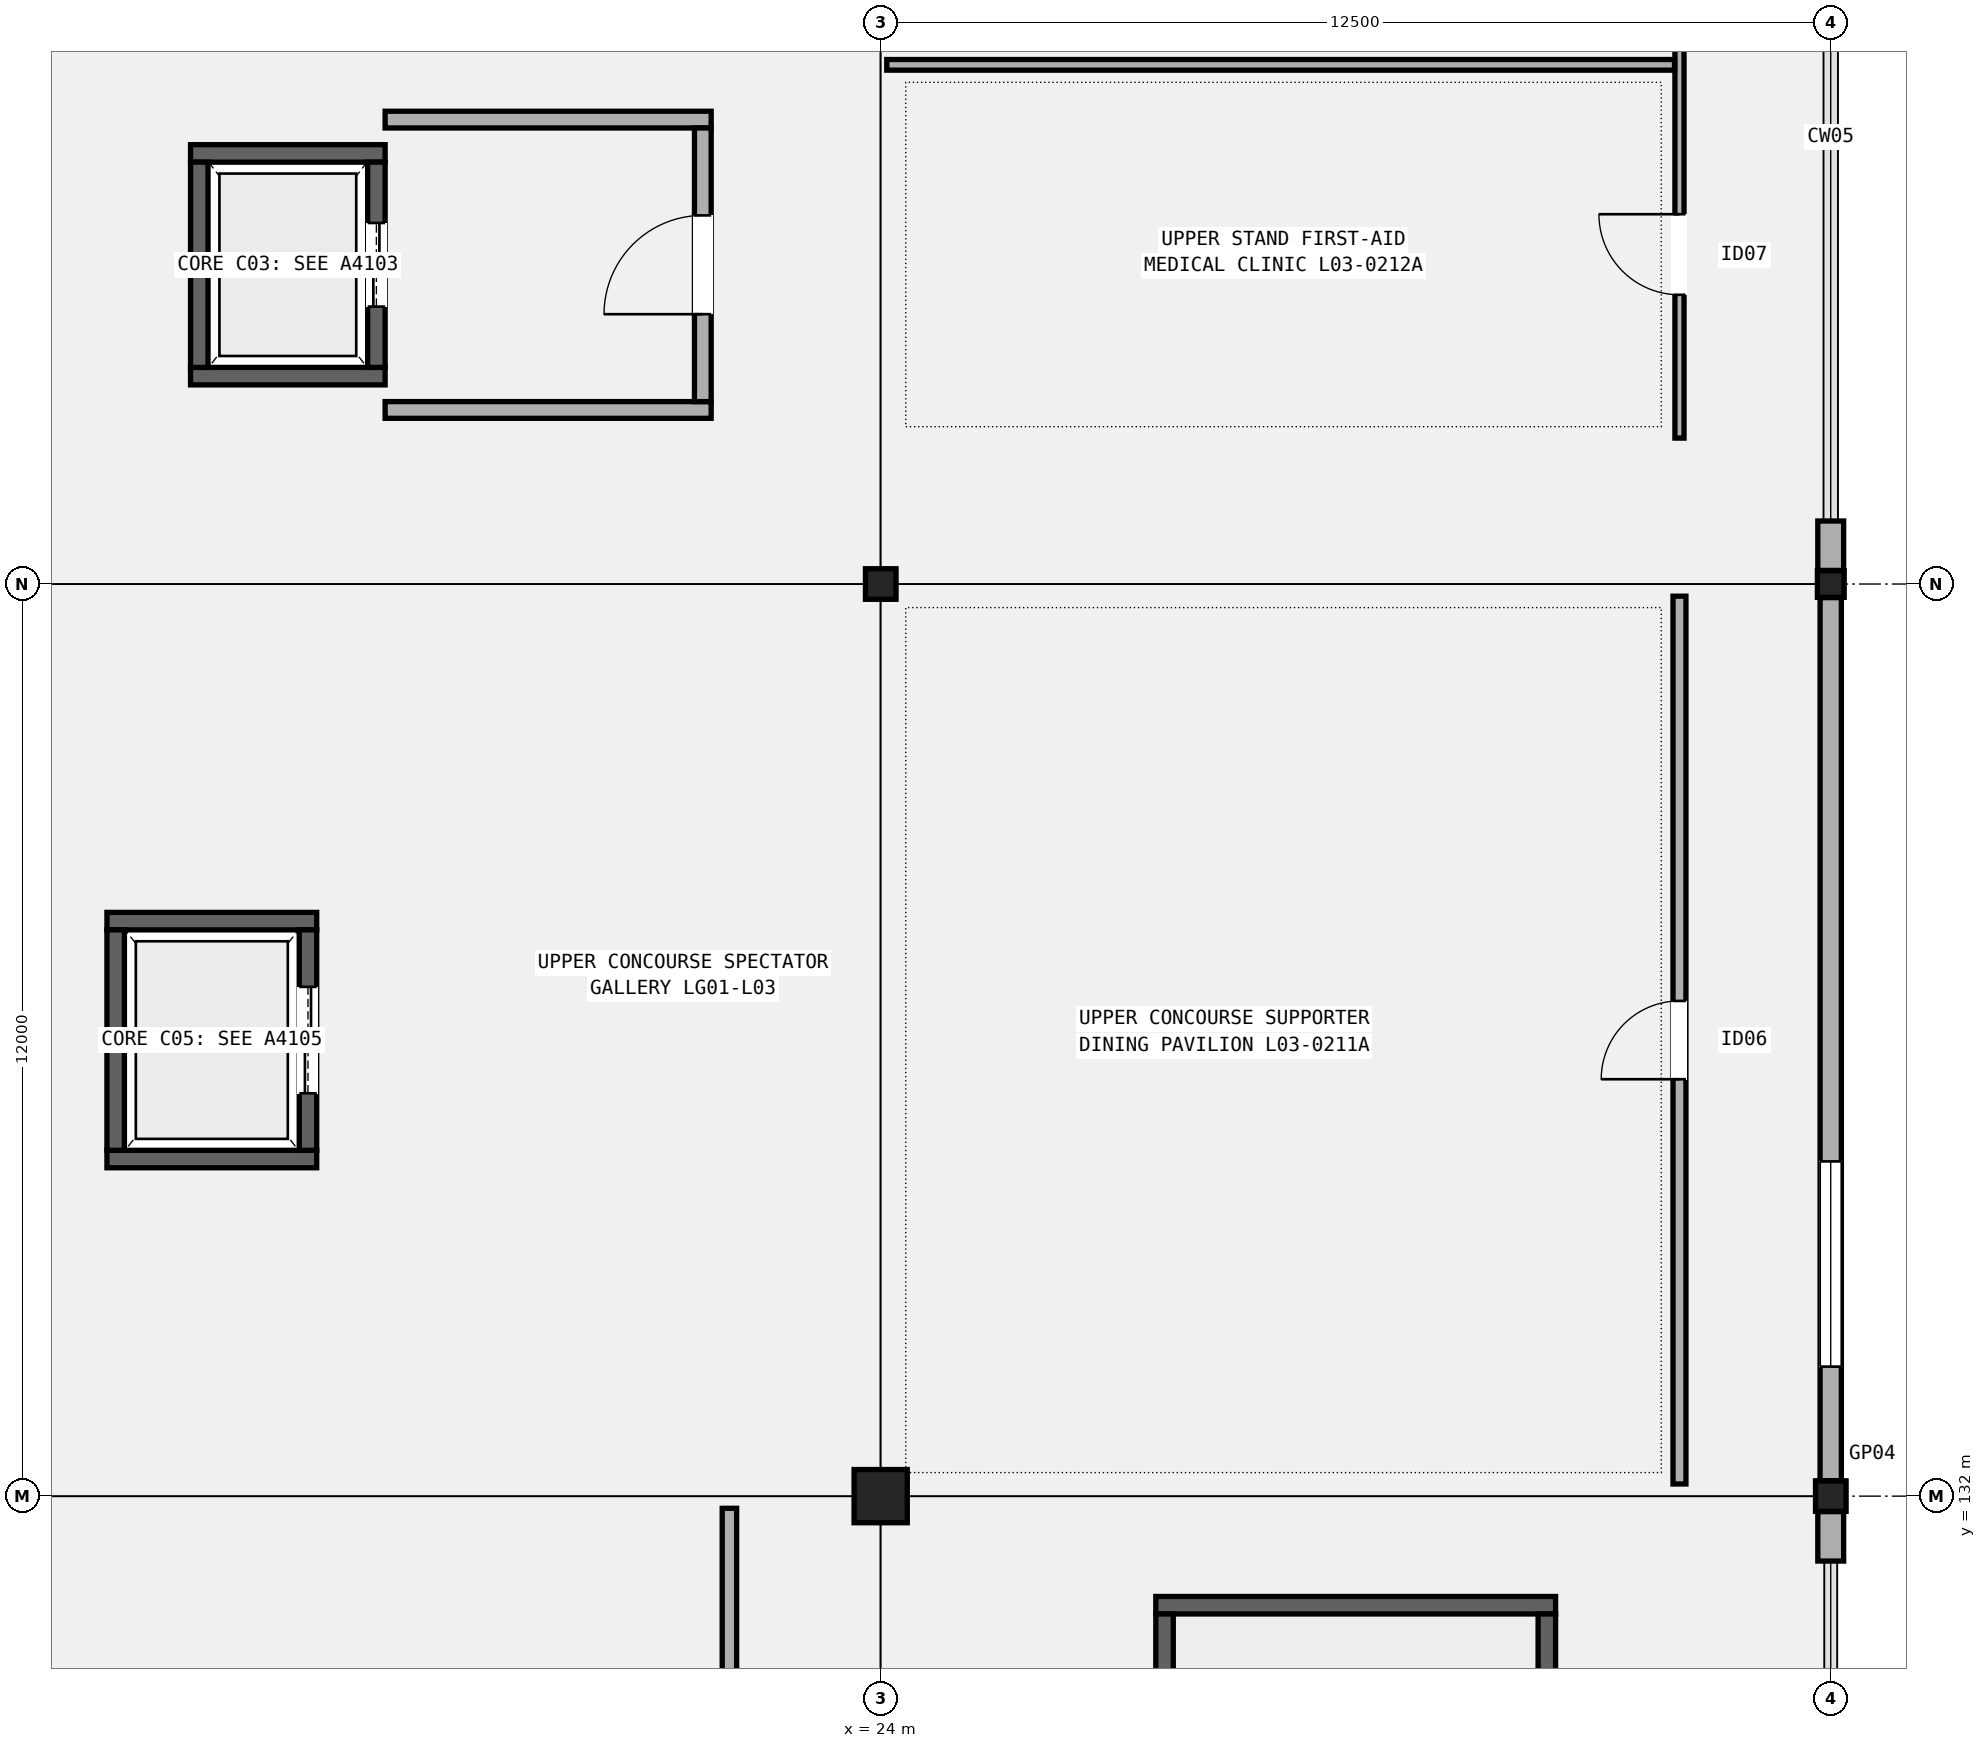
"""IFC4 building model, lengths in metres.
Left out: names, types, materials, properties, quantities, classifications, styles, units other than length and angle.
Written with IfcOpenShell. Run it as: python <this file> out.ifc"""

import sys

from ifc_helpers import new_model, si_unit, direction, frame, frame_2d, origin, origin_2d, place, context, subcontext, project, spatial, rectangle, hollow_rectangle, extrude, element, fill, save


model = new_model("IFC4")
c1 = context("Model", 3, precision=1e-05, world=origin(), true_north=direction((0.0, 1.0)))
c2 = subcontext(c1, "Body", "Model", "MODEL_VIEW")
j1 = project(units=[si_unit("LENGTHUNIT", "METRE"), si_unit("PLANEANGLEUNIT", "RADIAN")], contexts=[c1])
p1 = place(None, origin())
s1 = spatial("IfcSite", under=j1, at=p1, CompositionType="ELEMENT")
p2 = place(p1, origin())
s2 = spatial("IfcBuilding", under=s1, at=p2, CompositionType="ELEMENT")
p3 = place(p2, frame((0.0, 0.0, 15.3)))
s3 = spatial("IfcBuildingStorey", under=s2, at=p3, CompositionType="ELEMENT", Elevation=15.3)
p4 = place(p3, frame((24.0, 132.0, 0.0), z_axis=(0.0, 0.0, 1.0), x_axis=(1.0, 0.0, 0.0)))
e1 = element("IfcColumn", 1, at=p4, inside=s3, PredefinedType="COLUMN", context=c2, shape_type="SweptSolid", body=[
    extrude(rectangle(XDim=0.7, YDim=0.7, at=origin_2d()), origin(), (0.0, 0.0, 1.0), 5.1),
])
for number, where, z_axis, x_axis in (
    (2, (24.0, 144.0, 0.0), (0.0, 0.0, 1.0), (1.0, 0.0, 0.0)),
    (3, (36.5, 132.0, 0.0), (0.0, 0.0, 1.0), (1.0, 0.0, 0.0)),
):
    element("IfcColumn", number, at=place(p3, frame(where, z_axis=z_axis, x_axis=x_axis)), inside=s3, PredefinedType="COLUMN", context=c2, shape_type="SweptSolid", body=[
        extrude(hollow_rectangle(XDim=0.4, YDim=0.4, WallThickness=0.016, InnerFilletRadius=0.016, OuterFilletRadius=0.032, at=origin_2d()), origin(), (0.0, 0.0, 1.0), 5.1),
    ])
p5 = place(p3, frame((36.5, 144.0, 0.0), z_axis=(0.0, 0.0, 1.0), x_axis=(1.0, 0.0, 0.0)))
e4 = element("IfcColumn", 4, at=p5, inside=s3, PredefinedType="COLUMN", context=c2, shape_type="SweptSolid", body=[
    extrude(hollow_rectangle(XDim=0.35, YDim=0.35, WallThickness=0.016, InnerFilletRadius=0.016, OuterFilletRadius=0.032, at=origin_2d()), origin(), (0.0, 0.0, 1.0), 5.1),
])
p6 = place(p3, frame((36.5, 131.146, 0.0), z_axis=(0.0, 0.0, 1.0), x_axis=(0.0, 1.0, 0.0)))
e5 = element("IfcWall", 5, at=p6, inside=s3, PredefinedType="SOLIDWALL", context=c2, shape_type="SweptSolid", body=[
    extrude(rectangle(XDim=0.65, YDim=0.34, at=frame_2d((0.325, 0.0))), origin(), (0.0, 0.0, 1.0), 4.16),
])
p7 = place(p3, frame((36.5, 132.204, 0.0), z_axis=(0.0, 0.0, 1.0), x_axis=(0.0, 1.0, 0.0)))
e6 = element("IfcWall", 6, at=p7, inside=s3, PredefinedType="SOLIDWALL", context=c2, shape_type="SweptSolid", body=[
    extrude(rectangle(XDim=11.617, YDim=0.28, at=frame_2d((5.809, 0.0))), origin(), (0.0, 0.0, 1.0), 4.172),
])
p8 = place(p7, frame((1.5, 0.0, 0.95)))
e7 = element("IfcOpeningElement", 7, at=p8, cuts=e6, PredefinedType="OPENING", context=c2, shape_type="SweptSolid", body=[
    extrude(rectangle(XDim=2.7, YDim=2.2, at=frame_2d((1.35, 1.1))), frame((0.0, 0.15, 0.0), z_axis=(0.0, -1.0, 0.0), x_axis=(1.0, 0.0, 0.0)), (0.0, 0.0, 1.0), 0.3),
])
p9 = place(p3, frame((36.5, 144.179, 0.0), z_axis=(0.0, 0.0, 1.0), x_axis=(0.0, 1.0, 0.0)))
e8 = element("IfcWall", 8, at=p9, inside=s3, PredefinedType="SOLIDWALL", context=c2, shape_type="SweptSolid", body=[
    extrude(rectangle(XDim=0.65, YDim=0.34, at=frame_2d((0.325, 0.0))), origin(), (0.0, 0.0, 1.0), 4.06),
])
p10 = place(p3, frame((27.62, 130.565, 0.0), z_axis=(0.0, 0.0, 1.0), x_axis=(1.0, 0.0, 0.0)))
e9 = element("IfcWall", 9, at=p10, inside=s3, PredefinedType="SHEAR", context=c2, shape_type="SweptSolid", body=[
    extrude(rectangle(XDim=5.26, YDim=0.23, at=frame_2d((2.63, 0.0))), origin(), (0.0, 0.0, 1.0), 4.86),
])
for number, where, z_axis, x_axis in (
    (10, (27.735, 121.55, 0.0), (0.0, 0.0, 1.0), (0.0, 1.0, 0.0)),
    (11, (32.765, 121.55, 0.0), (0.0, 0.0, 1.0), (0.0, 1.0, 0.0)),
):
    element("IfcWall", number, at=place(p3, frame(where, z_axis=z_axis, x_axis=x_axis)), inside=s3, PredefinedType="SHEAR", context=c2, shape_type="SweptSolid", body=[
        extrude(rectangle(XDim=8.9, YDim=0.23, at=frame_2d((4.45, 0.0))), origin(), (0.0, 0.0, 1.0), 4.86),
    ])
for number, where, z_axis, x_axis in (
    (12, (14.92, 146.735, 0.0), (0.0, 0.0, 1.0), (1.0, 0.0, 0.0)),
    (13, (14.92, 149.665, 0.0), (0.0, 0.0, 1.0), (1.0, 0.0, 0.0)),
):
    element("IfcWall", number, at=place(p3, frame(where, z_axis=z_axis, x_axis=x_axis)), inside=s3, PredefinedType="SHEAR", context=c2, shape_type="SweptSolid", body=[
        extrude(rectangle(XDim=2.56, YDim=0.23, at=frame_2d((1.28, 0.0))), origin(), (0.0, 0.0, 1.0), 4.86),
    ])
p11 = place(p3, frame((15.035, 146.85, 0.0), z_axis=(0.0, 0.0, 1.0), x_axis=(0.0, 1.0, 0.0)))
e14 = element("IfcWall", 14, at=p11, inside=s3, PredefinedType="SHEAR", context=c2, shape_type="SweptSolid", body=[
    extrude(rectangle(XDim=2.7, YDim=0.23, at=frame_2d((1.35, 0.0))), origin(), (0.0, 0.0, 1.0), 4.86),
])
p12 = place(p3, frame((17.365, 146.85, 0.0), z_axis=(0.0, 0.0, 1.0), x_axis=(0.0, 1.0, 0.0)))
e15 = element("IfcWall", 15, at=p12, inside=s3, PredefinedType="SHEAR", context=c2, shape_type="SweptSolid", body=[
    extrude(rectangle(XDim=2.7, YDim=0.23, at=frame_2d((1.35, 0.0))), origin(), (0.0, 0.0, 1.0), 4.86),
])
p13 = place(p12, frame((0.8, 0.0, 0.0)))
e16 = element("IfcOpeningElement", 16, at=p13, cuts=e15, PredefinedType="OPENING", context=c2, shape_type="SweptSolid", body=[
    extrude(rectangle(XDim=1.1, YDim=2.15, at=frame_2d((0.55, 1.075))), frame((0.0, 0.125, 0.0), z_axis=(0.0, -1.0, 0.0), x_axis=(1.0, 0.0, 0.0)), (0.0, 0.0, 1.0), 0.25),
])
for number, where, z_axis, x_axis in (
    (17, (17.48, 146.29, 0.0), (0.0, 0.0, 1.0), (1.0, 0.0, 0.0)),
    (18, (17.48, 150.11, 0.0), (0.0, 0.0, 1.0), (1.0, 0.0, 0.0)),
):
    element("IfcWall", number, at=place(p3, frame(where, z_axis=z_axis, x_axis=x_axis)), inside=s3, PredefinedType="SOLIDWALL", context=c2, shape_type="SweptSolid", body=[
        extrude(rectangle(XDim=4.29, YDim=0.22, at=frame_2d((2.145, 0.0))), origin(), (0.0, 0.0, 1.0), 4.22),
    ])
p14 = place(p3, frame((21.66, 146.4, 0.0), z_axis=(0.0, 0.0, 1.0), x_axis=(0.0, 1.0, 0.0)))
e19 = element("IfcWall", 19, at=p14, inside=s3, PredefinedType="SOLIDWALL", context=c2, shape_type="SweptSolid", body=[
    extrude(rectangle(XDim=3.6, YDim=0.22, at=frame_2d((1.8, 0.0))), origin(), (0.0, 0.0, 1.0), 4.22),
])
p15 = place(p14, frame((1.15, 0.0, 0.0)))
e20 = element("IfcOpeningElement", 20, at=p15, cuts=e19, PredefinedType="OPENING", context=c2, shape_type="SweptSolid", body=[
    extrude(rectangle(XDim=1.3, YDim=2.15, at=frame_2d((0.65, 1.075))), frame((0.0, 0.12, 0.0), z_axis=(0.0, -1.0, 0.0), x_axis=(1.0, 0.0, 0.0)), (0.0, 0.0, 1.0), 0.24),
])
for number, where, z_axis, x_axis in (
    (21, (13.82, 136.435, 0.0), (0.0, 0.0, 1.0), (1.0, 0.0, 0.0)),
    (22, (13.82, 139.565, 0.0), (0.0, 0.0, 1.0), (1.0, 0.0, 0.0)),
):
    element("IfcWall", number, at=place(p3, frame(where, z_axis=z_axis, x_axis=x_axis)), inside=s3, PredefinedType="SHEAR", context=c2, shape_type="SweptSolid", body=[
        extrude(rectangle(XDim=2.76, YDim=0.23, at=frame_2d((1.38, 0.0))), origin(), (0.0, 0.0, 1.0), 4.86),
    ])
p16 = place(p3, frame((13.935, 136.55, 0.0), z_axis=(0.0, 0.0, 1.0), x_axis=(0.0, 1.0, 0.0)))
e23 = element("IfcWall", 23, at=p16, inside=s3, PredefinedType="SHEAR", context=c2, shape_type="SweptSolid", body=[
    extrude(rectangle(XDim=2.9, YDim=0.23, at=frame_2d((1.45, 0.0))), origin(), (0.0, 0.0, 1.0), 4.86),
])
p17 = place(p3, frame((16.465, 136.55, 0.0), z_axis=(0.0, 0.0, 1.0), x_axis=(0.0, 1.0, 0.0)))
e24 = element("IfcWall", 24, at=p17, inside=s3, PredefinedType="SHEAR", context=c2, shape_type="SweptSolid", body=[
    extrude(rectangle(XDim=2.9, YDim=0.23, at=frame_2d((1.45, 0.0))), origin(), (0.0, 0.0, 1.0), 4.86),
])
p18 = place(p17, frame((0.75, 0.0, 0.0)))
e25 = element("IfcOpeningElement", 25, at=p18, cuts=e24, PredefinedType="OPENING", context=c2, shape_type="SweptSolid", body=[
    extrude(rectangle(XDim=1.4, YDim=2.25, at=frame_2d((0.7, 1.125))), frame((0.0, 0.125, 0.0), z_axis=(0.0, -1.0, 0.0), x_axis=(1.0, 0.0, 0.0)), (0.0, 0.0, 1.0), 0.25),
])
p19 = place(p3, frame((22.01, 120.16, 0.0), z_axis=(0.0, 0.0, 1.0), x_axis=(0.0, 1.0, 0.0)))
e26 = element("IfcWall", 26, at=p19, inside=s3, PredefinedType="PARTITIONING", context=c2, shape_type="SweptSolid", body=[
    extrude(rectangle(XDim=11.68, YDim=0.19, at=frame_2d((5.84, 0.0))), origin(), (0.0, 0.0, 1.0), 4.22),
])
p20 = place(p19, frame((5.1, 0.0, 0.0)))
e27 = element("IfcOpeningElement", 27, at=p20, cuts=e26, PredefinedType="OPENING", context=c2, shape_type="SweptSolid", body=[
    extrude(rectangle(XDim=1.48, YDim=2.24, at=frame_2d((0.74, 1.12))), frame((0.0, 0.105, 0.0), z_axis=(0.0, -1.0, 0.0), x_axis=(1.0, 0.0, 0.0)), (0.0, 0.0, 1.0), 0.21),
])
p21 = place(p3, frame((34.51, 132.16, 0.0), z_axis=(0.0, 0.0, 1.0), x_axis=(0.0, 1.0, 0.0)))
e28 = element("IfcWall", 28, at=p21, inside=s3, PredefinedType="PARTITIONING", context=c2, shape_type="SweptSolid", body=[
    extrude(rectangle(XDim=11.68, YDim=0.17, at=frame_2d((5.84, 0.0))), origin(), (0.0, 0.0, 1.0), 2.77),
])
p22 = place(p21, frame((5.325, 0.0, 0.0)))
e29 = element("IfcOpeningElement", 29, at=p22, cuts=e28, PredefinedType="OPENING", context=c2, shape_type="SweptSolid", body=[
    extrude(rectangle(XDim=1.03, YDim=2.12, at=frame_2d((0.515, 1.06))), frame((0.0, 0.095, 0.0), z_axis=(0.0, -1.0, 0.0), x_axis=(1.0, 0.0, 0.0)), (0.0, 0.0, 1.0), 0.19),
])
p23 = place(p3, frame((34.51, 145.92, 0.0), z_axis=(0.0, 0.0, 1.0), x_axis=(0.0, 1.0, 0.0)))
e30 = element("IfcWall", 30, at=p23, inside=s3, PredefinedType="PARTITIONING", context=c2, shape_type="SweptSolid", body=[
    extrude(rectangle(XDim=9.92, YDim=0.12, at=frame_2d((4.96, 0.0))), origin(), (0.0, 0.0, 1.0), 4.22),
])
p24 = place(p23, frame((1.885, 0.0, 0.0)))
e31 = element("IfcOpeningElement", 31, at=p24, cuts=e30, PredefinedType="OPENING", context=c2, shape_type="SweptSolid", body=[
    extrude(rectangle(XDim=1.06, YDim=2.15, at=frame_2d((0.53, 1.075))), frame((0.0, 0.07, 0.0), z_axis=(0.0, -1.0, 0.0), x_axis=(1.0, 0.0, 0.0)), (0.0, 0.0, 1.0), 0.14),
])
p25 = place(p23, frame((6.91, 0.0, 0.0)))
e32 = element("IfcOpeningElement", 32, at=p25, cuts=e30, PredefinedType="OPENING", context=c2, shape_type="SweptSolid", body=[
    extrude(rectangle(XDim=1.09, YDim=2.16, at=frame_2d((0.545, 1.08))), frame((0.0, 0.07, 0.0), z_axis=(0.0, -1.0, 0.0), x_axis=(1.0, 0.0, 0.0)), (0.0, 0.0, 1.0), 0.14),
])
p26 = place(p3, frame((24.08, 150.83, 0.0), z_axis=(0.0, 0.0, 1.0), x_axis=(1.0, 0.0, 0.0)))
e33 = element("IfcWall", 33, at=p26, inside=s3, PredefinedType="PARTITIONING", context=c2, shape_type="SweptSolid", body=[
    extrude(rectangle(XDim=10.365, YDim=0.14, at=frame_2d((5.183, 0.0))), origin(), (0.0, 0.0, 1.0), 4.22),
])
p27 = place(p8, origin())
e34 = element("IfcWindow", 34, at=p27, inside=s3, PartitioningType="SINGLE_PANEL", PredefinedType="WINDOW", context=c2, shape_type="SweptSolid", body=[
    extrude(rectangle(XDim=2.7, YDim=2.2, at=frame_2d((1.35, 1.1))), frame((0.0, 0.03, 0.0), z_axis=(0.0, -1.0, 0.0), x_axis=(1.0, 0.0, 0.0)), (0.0, 0.0, 1.0), 0.06),
])
fill(e7, e34)
p28 = place(p13, origin())
e35 = element("IfcDoor", 35, at=p28, inside=s3, OperationType="DOUBLE_DOOR_SLIDING", PredefinedType="DOOR", context=c2, shape_type="SweptSolid", body=[
    extrude(rectangle(XDim=1.1, YDim=2.15, at=frame_2d((0.55, 1.075))), frame((0.0, 0.025, 0.0), z_axis=(0.0, -1.0, 0.0), x_axis=(1.0, 0.0, 0.0)), (0.0, 0.0, 1.0), 0.05),
])
fill(e16, e35)
p29 = place(p15, origin())
e36 = element("IfcDoor", 36, at=p29, inside=s3, OperationType="SINGLE_SWING_LEFT", PredefinedType="DOOR", context=c2, shape_type="SweptSolid", body=[
    extrude(rectangle(XDim=1.3, YDim=2.15, at=frame_2d((0.65, 1.075))), frame((0.0, 0.025, 0.0), z_axis=(0.0, -1.0, 0.0), x_axis=(1.0, 0.0, 0.0)), (0.0, 0.0, 1.0), 0.05),
])
fill(e20, e36)
p30 = place(p18, origin())
e37 = element("IfcDoor", 37, at=p30, inside=s3, OperationType="DOUBLE_DOOR_SLIDING", PredefinedType="DOOR", context=c2, shape_type="SweptSolid", body=[
    extrude(rectangle(XDim=1.4, YDim=2.25, at=frame_2d((0.7, 1.125))), frame((0.0, 0.025, 0.0), z_axis=(0.0, -1.0, 0.0), x_axis=(1.0, 0.0, 0.0)), (0.0, 0.0, 1.0), 0.05),
])
fill(e25, e37)
p31 = place(p22, origin())
e38 = element("IfcDoor", 38, at=p31, inside=s3, OperationType="SINGLE_SWING_LEFT", PredefinedType="DOOR", context=c2, shape_type="SweptSolid", body=[
    extrude(rectangle(XDim=1.03, YDim=2.12, at=frame_2d((0.515, 1.06))), frame((0.0, 0.025, 0.0), z_axis=(0.0, -1.0, 0.0), x_axis=(1.0, 0.0, 0.0)), (0.0, 0.0, 1.0), 0.05),
])
fill(e29, e38)
p32 = place(p24, origin())
e39 = element("IfcDoor", 39, at=p32, inside=s3, OperationType="SINGLE_SWING_RIGHT", PredefinedType="DOOR", context=c2, shape_type="SweptSolid", body=[
    extrude(rectangle(XDim=1.06, YDim=2.15, at=frame_2d((0.53, 1.075))), frame((0.0, 0.025, 0.0), z_axis=(0.0, -1.0, 0.0), x_axis=(1.0, 0.0, 0.0)), (0.0, 0.0, 1.0), 0.05),
])
fill(e31, e39)
save(model, sys.argv[1])
